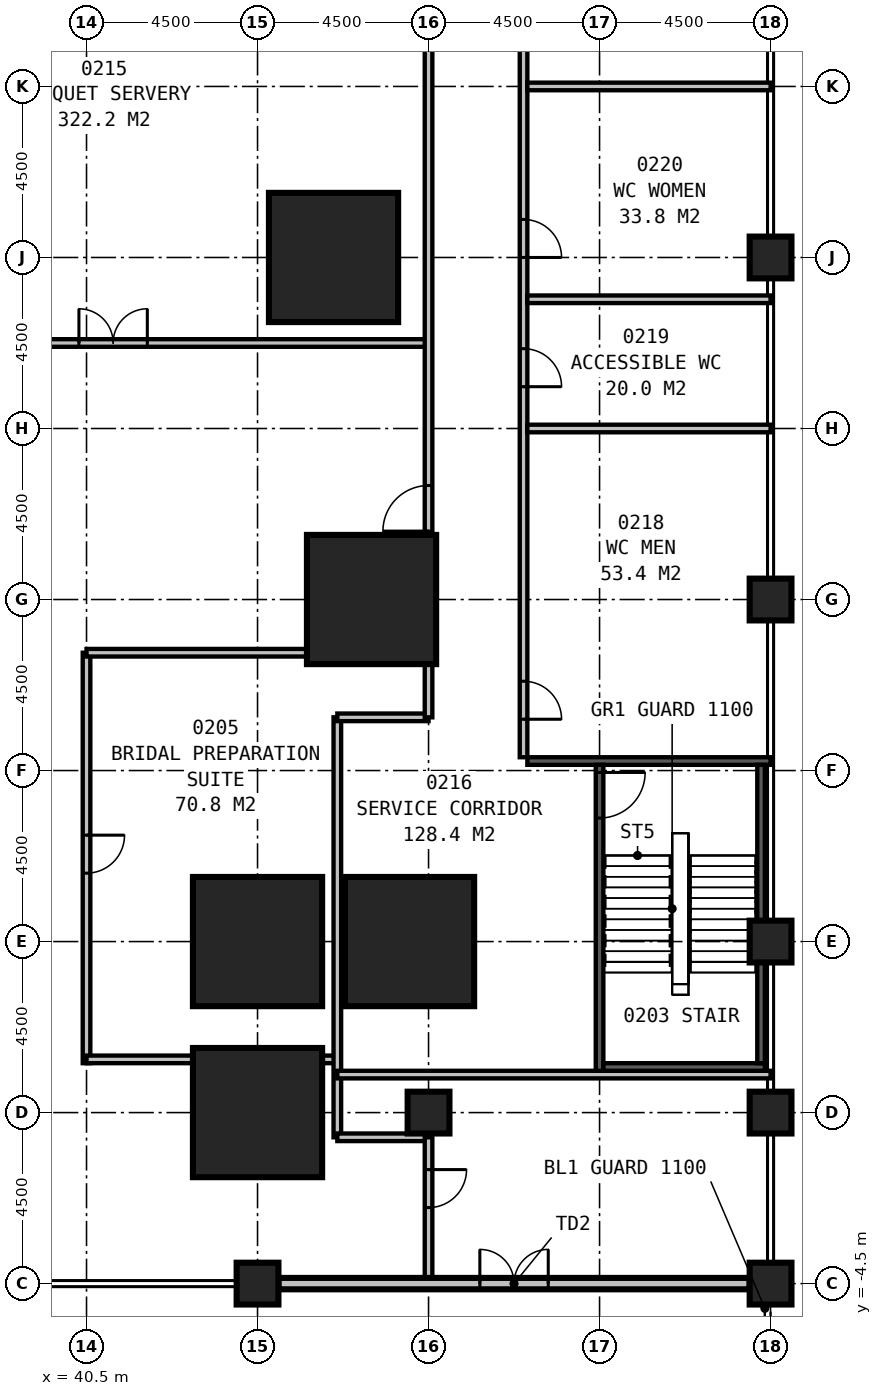
"""IFC4 building model, lengths in metres.
Left out: names, types, materials, properties, quantities, classifications, styles, units other than length and angle.
Written with IfcOpenShell. Run it as: python <this file> out.ifc"""

import sys

from ifc_helpers import new_model, si_unit, direction, frame, frame_2d, origin, origin_2d, place, context, subcontext, project, spatial, rectangle, extrude, element, fill, save


model = new_model("IFC4")
c1 = context("Model", 3, precision=1e-05, world=origin(), true_north=direction((0.0, 1.0)))
c2 = subcontext(c1, "Body", "Model", "MODEL_VIEW")
j1 = project(units=[si_unit("LENGTHUNIT", "METRE"), si_unit("PLANEANGLEUNIT", "RADIAN")], contexts=[c1])
p1 = place(None, origin())
s1 = spatial("IfcSite", under=j1, at=p1, CompositionType="ELEMENT")
p2 = place(p1, origin())
s2 = spatial("IfcBuilding", under=s1, at=p2, CompositionType="ELEMENT")
p3 = place(p2, frame((0.0, 0.0, 11.0)))
s3 = spatial("IfcBuildingStorey", under=s2, at=p3, CompositionType="ELEMENT", Elevation=11.0)
for number, where, z_axis, x_axis in (
    (1, (45.0, 0.0, 0.0), (0.0, 0.0, 1.0), (1.0, 0.0, 0.0)),
    (2, (45.0, 4.5, 0.0), (0.0, 0.0, 1.0), (1.0, 0.0, 0.0)),
    (3, (49.0, 4.5, 0.0), (0.0, 0.0, 1.0), (1.0, 0.0, 0.0)),
    (4, (48.0, 13.5, 0.0), (0.0, 0.0, 1.0), (1.0, 0.0, 0.0)),
    (5, (47.0, 22.5, 0.0), (0.0, 0.0, 1.0), (1.0, 0.0, 0.0)),
):
    element("IfcColumn", number, at=place(p3, frame(where, z_axis=z_axis, x_axis=x_axis)), inside=s3, PredefinedType="COLUMN", context=c2, shape_type="SweptSolid", body=[
        extrude(rectangle(XDim=3.4, YDim=3.4, at=origin_2d()), origin(), (0.0, 0.0, 1.0), 8.0),
    ])
for number, where, z_axis, x_axis in (
    (6, (58.5, -4.5, 0.0), (0.0, 0.0, 1.0), (1.0, 0.0, 0.0)),
    (7, (58.5, 4.5, 0.0), (0.0, 0.0, 1.0), (1.0, 0.0, 0.0)),
    (8, (58.5, 13.5, 0.0), (0.0, 0.0, 1.0), (1.0, 0.0, 0.0)),
    (9, (58.5, 22.5, 0.0), (0.0, 0.0, 1.0), (1.0, 0.0, 0.0)),
    (10, (58.5, 0.0, 0.0), (0.0, 0.0, 1.0), (1.0, 0.0, 0.0)),
    (11, (45.0, -4.5, 0.0), (0.0, 0.0, 1.0), (1.0, 0.0, 0.0)),
    (12, (49.5, 0.0, 0.0), (0.0, 0.0, 1.0), (1.0, 0.0, 0.0)),
):
    element("IfcColumn", number, at=place(p3, frame(where, z_axis=z_axis, x_axis=x_axis)), inside=s3, PredefinedType="COLUMN", context=c2, shape_type="SweptSolid", body=[
        extrude(rectangle(XDim=1.1, YDim=1.1, at=origin_2d()), origin(), (0.0, 0.0, 1.0), 8.0),
    ])
p4 = place(p3, frame((45.55, -4.5, 0.0), z_axis=(0.0, 0.0, 1.0), x_axis=(1.0, 0.0, 0.0)))
e13 = element("IfcWall", 13, at=p4, inside=s3, PredefinedType="STANDARD", context=c2, shape_type="SweptSolid", body=[
    extrude(rectangle(XDim=12.4, YDim=0.3, at=frame_2d((6.2, 0.0))), origin(), (0.0, 0.0, 1.0), 6.0),
])
p5 = place(p4, frame((5.3, 0.0, 0.0)))
e14 = element("IfcOpeningElement", 14, at=p5, cuts=e13, PredefinedType="OPENING", context=c2, shape_type="SweptSolid", body=[
    extrude(rectangle(XDim=1.8, YDim=2.4, at=frame_2d((0.9, 1.2))), frame((0.0, 0.16, 0.0), z_axis=(0.0, -1.0, 0.0), x_axis=(1.0, 0.0, 0.0)), (0.0, 0.0, 1.0), 0.32),
])
p6 = place(p3, frame((54.0, 1.1, 0.0), z_axis=(0.0, 0.0, 1.0), x_axis=(0.0, 1.0, 0.0)))
e15 = element("IfcWall", 15, at=p6, inside=s3, PredefinedType="SOLIDWALL", context=c2, shape_type="SweptSolid", body=[
    extrude(rectangle(XDim=8.05, YDim=0.2, at=frame_2d((4.025, 0.0))), origin(), (0.0, 0.0, 1.0), 7.7),
])
p7 = place(p6, frame((7.85, 0.0, 0.0), z_axis=(0.0, 0.0, 1.0), x_axis=(-1.0, 0.0, 0.0)))
e16 = element("IfcOpeningElement", 16, at=p7, cuts=e15, PredefinedType="OPENING", context=c2, shape_type="SweptSolid", body=[
    extrude(rectangle(XDim=1.2, YDim=2.1, at=frame_2d((0.6, 1.05))), frame((0.0, 0.11, 0.0), z_axis=(0.0, -1.0, 0.0), x_axis=(1.0, 0.0, 0.0)), (0.0, 0.0, 1.0), 0.22),
])
p8 = place(p3, frame((52.1, 9.25, 0.0), z_axis=(0.0, 0.0, 1.0), x_axis=(1.0, 0.0, 0.0)))
e17 = element("IfcWall", 17, at=p8, inside=s3, PredefinedType="SOLIDWALL", context=c2, shape_type="SweptSolid", body=[
    extrude(rectangle(XDim=6.4, YDim=0.2, at=frame_2d((3.2, 0.0))), origin(), (0.0, 0.0, 1.0), 7.7),
])
p9 = place(p3, frame((54.1, 1.2, 0.0), z_axis=(0.0, 0.0, 1.0), x_axis=(1.0, 0.0, 0.0)))
e18 = element("IfcWall", 18, at=p9, inside=s3, PredefinedType="SOLIDWALL", context=c2, shape_type="SweptSolid", body=[
    extrude(rectangle(XDim=4.25, YDim=0.2, at=frame_2d((2.125, 0.0))), origin(), (0.0, 0.0, 1.0), 7.7),
])
p10 = place(p3, frame((58.25, 1.3, 0.0), z_axis=(0.0, 0.0, 1.0), x_axis=(0.0, 1.0, 0.0)))
e19 = element("IfcWall", 19, at=p10, inside=s3, PredefinedType="SOLIDWALL", context=c2, shape_type="SweptSolid", body=[
    extrude(rectangle(XDim=2.65, YDim=0.2, at=frame_2d((1.325, 0.0))), origin(), (0.0, 0.0, 1.0), 7.7),
])
p11 = place(p3, frame((58.25, 5.05, 0.0), z_axis=(0.0, 0.0, 1.0), x_axis=(0.0, 1.0, 0.0)))
e20 = element("IfcWall", 20, at=p11, inside=s3, PredefinedType="SOLIDWALL", context=c2, shape_type="SweptSolid", body=[
    extrude(rectangle(XDim=4.1, YDim=0.2, at=frame_2d((2.05, 0.0))), origin(), (0.0, 0.0, 1.0), 7.7),
])
p12 = place(p3, frame((49.5, -4.5, 0.0), z_axis=(0.0, 0.0, 1.0), x_axis=(0.0, 1.0, 0.0)))
e21 = element("IfcWall", 21, at=p12, inside=s3, PredefinedType="PARTITIONING", context=c2, shape_type="SweptSolid", body=[
    extrude(rectangle(XDim=3.85, YDim=0.2, at=frame_2d((1.925, 0.0))), origin(), (0.0, 0.0, 1.0), 7.7),
])
p13 = place(p12, frame((3.0, 0.0, 0.0), z_axis=(0.0, 0.0, 1.0), x_axis=(-1.0, 0.0, 0.0)))
e22 = element("IfcOpeningElement", 22, at=p13, cuts=e21, PredefinedType="OPENING", context=c2, shape_type="SweptSolid", body=[
    extrude(rectangle(XDim=1.0, YDim=2.1, at=frame_2d((0.5, 1.05))), frame((0.0, 0.11, 0.0), z_axis=(0.0, -1.0, 0.0), x_axis=(1.0, 0.0, 0.0)), (0.0, 0.0, 1.0), 0.22),
])
p14 = place(p3, frame((47.1, -0.65, 0.0), z_axis=(0.0, 0.0, 1.0), x_axis=(1.0, 0.0, 0.0)))
e23 = element("IfcWall", 23, at=p14, inside=s3, PredefinedType="PARTITIONING", context=c2, shape_type="SweptSolid", body=[
    extrude(rectangle(XDim=2.4, YDim=0.2, at=frame_2d((1.2, 0.0))), origin(), (0.0, 0.0, 1.0), 6.8),
])
p15 = place(p3, frame((47.1, -0.65, 0.0), z_axis=(0.0, 0.0, 1.0), x_axis=(0.0, 1.0, 0.0)))
e24 = element("IfcWall", 24, at=p15, inside=s3, PredefinedType="PARTITIONING", context=c2, shape_type="SweptSolid", body=[
    extrude(rectangle(XDim=11.05, YDim=0.2, at=frame_2d((5.525, 0.0))), origin(), (0.0, 0.0, 1.0), 7.7),
])
p16 = place(p3, frame((47.1, 10.4, 0.0), z_axis=(0.0, 0.0, 1.0), x_axis=(1.0, 0.0, 0.0)))
e25 = element("IfcWall", 25, at=p16, inside=s3, PredefinedType="PARTITIONING", context=c2, shape_type="SweptSolid", body=[
    extrude(rectangle(XDim=2.4, YDim=0.2, at=frame_2d((1.2, 0.0))), origin(), (0.0, 0.0, 1.0), 7.7),
])
p17 = place(p3, frame((49.5, 10.4, 0.0), z_axis=(0.0, 0.0, 1.0), x_axis=(0.0, 1.0, 0.0)))
e26 = element("IfcWall", 26, at=p17, inside=s3, PredefinedType="PARTITIONING", context=c2, shape_type="SweptSolid", body=[
    extrude(rectangle(XDim=30.1, YDim=0.2, at=frame_2d((15.05, 0.0))), origin(), (0.0, 0.0, 1.0), 7.7),
])
p18 = place(p17, frame((4.9, 0.0, 0.0)))
e27 = element("IfcOpeningElement", 27, at=p18, cuts=e26, PredefinedType="OPENING", context=c2, shape_type="SweptSolid", body=[
    extrude(rectangle(XDim=1.2, YDim=2.1, at=frame_2d((0.6, 1.05))), frame((0.0, 0.11, 0.0), z_axis=(0.0, -1.0, 0.0), x_axis=(1.0, 0.0, 0.0)), (0.0, 0.0, 1.0), 0.22),
])
p19 = place(p3, frame((40.5, 1.3, 0.0), z_axis=(0.0, 0.0, 1.0), x_axis=(0.0, 1.0, 0.0)))
e28 = element("IfcWall", 28, at=p19, inside=s3, PredefinedType="PARTITIONING", context=c2, shape_type="SweptSolid", body=[
    extrude(rectangle(XDim=10.8, YDim=0.2, at=frame_2d((5.4, 0.0))), origin(), (0.0, 0.0, 1.0), 6.7),
])
p20 = place(p19, frame((6.0, 0.0, 0.0), z_axis=(0.0, 0.0, 1.0), x_axis=(-1.0, 0.0, 0.0)))
e29 = element("IfcOpeningElement", 29, at=p20, cuts=e28, PredefinedType="OPENING", context=c2, shape_type="SweptSolid", body=[
    extrude(rectangle(XDim=1.0, YDim=2.1, at=frame_2d((0.5, 1.05))), frame((0.0, 0.11, 0.0), z_axis=(0.0, -1.0, 0.0), x_axis=(1.0, 0.0, 0.0)), (0.0, 0.0, 1.0), 0.22),
])
p21 = place(p3, frame((40.5, 12.1, 0.0), z_axis=(0.0, 0.0, 1.0), x_axis=(1.0, 0.0, 0.0)))
e30 = element("IfcWall", 30, at=p21, inside=s3, PredefinedType="PARTITIONING", context=c2, shape_type="SweptSolid", body=[
    extrude(rectangle(XDim=9.0, YDim=0.2, at=frame_2d((4.5, 0.0))), origin(), (0.0, 0.0, 1.0), 7.7),
])
p22 = place(p3, frame((40.5, 1.4, 0.0), z_axis=(0.0, 0.0, 1.0), x_axis=(1.0, 0.0, 0.0)))
e31 = element("IfcWall", 31, at=p22, inside=s3, PredefinedType="PARTITIONING", context=c2, shape_type="SweptSolid", body=[
    extrude(rectangle(XDim=6.6, YDim=0.2, at=frame_2d((3.3, 0.0))), origin(), (0.0, 0.0, 1.0), 6.8),
])
p23 = place(p3, frame((36.3, 20.25, 0.0), z_axis=(0.0, 0.0, 1.0), x_axis=(1.0, 0.0, 0.0)))
e32 = element("IfcWall", 32, at=p23, inside=s3, PredefinedType="PARTITIONING", context=c2, shape_type="SweptSolid", body=[
    extrude(rectangle(XDim=13.2, YDim=0.2, at=frame_2d((6.6, 0.0))), origin(), (0.0, 0.0, 1.0), 7.7),
])
p24 = place(p23, frame((4.0, 0.0, 0.0)))
e33 = element("IfcOpeningElement", 33, at=p24, cuts=e32, PredefinedType="OPENING", context=c2, shape_type="SweptSolid", body=[
    extrude(rectangle(XDim=1.8, YDim=2.4, at=frame_2d((0.9, 1.2))), frame((0.0, 0.11, 0.0), z_axis=(0.0, -1.0, 0.0), x_axis=(1.0, 0.0, 0.0)), (0.0, 0.0, 1.0), 0.22),
])
p25 = place(p3, frame((52.0, 9.35, 0.0), z_axis=(0.0, 0.0, 1.0), x_axis=(0.0, 1.0, 0.0)))
e34 = element("IfcWall", 34, at=p25, inside=s3, PredefinedType="PARTITIONING", context=c2, shape_type="SweptSolid", body=[
    extrude(rectangle(XDim=31.15, YDim=0.2, at=frame_2d((15.575, 0.0))), origin(), (0.0, 0.0, 1.0), 7.7),
])
p26 = place(p25, frame((2.0, 0.0, 0.0), z_axis=(0.0, 0.0, 1.0), x_axis=(-1.0, 0.0, 0.0)))
e35 = element("IfcOpeningElement", 35, at=p26, cuts=e34, PredefinedType="OPENING", context=c2, shape_type="SweptSolid", body=[
    extrude(rectangle(XDim=1.0, YDim=2.1, at=frame_2d((0.5, 1.05))), frame((0.0, 0.11, 0.0), z_axis=(0.0, -1.0, 0.0), x_axis=(1.0, 0.0, 0.0)), (0.0, 0.0, 1.0), 0.22),
])
p27 = place(p25, frame((10.75, 0.0, 0.0), z_axis=(0.0, 0.0, 1.0), x_axis=(-1.0, 0.0, 0.0)))
e36 = element("IfcOpeningElement", 36, at=p27, cuts=e34, PredefinedType="OPENING", context=c2, shape_type="SweptSolid", body=[
    extrude(rectangle(XDim=1.0, YDim=2.1, at=frame_2d((0.5, 1.05))), frame((0.0, 0.11, 0.0), z_axis=(0.0, -1.0, 0.0), x_axis=(1.0, 0.0, 0.0)), (0.0, 0.0, 1.0), 0.22),
])
p28 = place(p25, frame((14.15, 0.0, 0.0), z_axis=(0.0, 0.0, 1.0), x_axis=(-1.0, 0.0, 0.0)))
e37 = element("IfcOpeningElement", 37, at=p28, cuts=e34, PredefinedType="OPENING", context=c2, shape_type="SweptSolid", body=[
    extrude(rectangle(XDim=1.0, YDim=2.1, at=frame_2d((0.5, 1.05))), frame((0.0, 0.11, 0.0), z_axis=(0.0, -1.0, 0.0), x_axis=(1.0, 0.0, 0.0)), (0.0, 0.0, 1.0), 0.22),
])
p29 = place(p25, frame((19.75, 0.0, 0.0), z_axis=(0.0, 0.0, 1.0), x_axis=(-1.0, 0.0, 0.0)))
e38 = element("IfcOpeningElement", 38, at=p29, cuts=e34, PredefinedType="OPENING", context=c2, shape_type="SweptSolid", body=[
    extrude(rectangle(XDim=1.0, YDim=2.1, at=frame_2d((0.5, 1.05))), frame((0.0, 0.11, 0.0), z_axis=(0.0, -1.0, 0.0), x_axis=(1.0, 0.0, 0.0)), (0.0, 0.0, 1.0), 0.22),
])
p30 = place(p3, frame((47.1, 1.0, 0.0), z_axis=(0.0, 0.0, 1.0), x_axis=(1.0, 0.0, 0.0)))
e39 = element("IfcWall", 39, at=p30, inside=s3, PredefinedType="PARTITIONING", context=c2, shape_type="SweptSolid", body=[
    extrude(rectangle(XDim=11.4, YDim=0.2, at=frame_2d((5.7, 0.0))), origin(), (0.0, 0.0, 1.0), 6.8),
])
for number, where, z_axis, x_axis in (
    (40, (52.1, 18.0, 0.0), (0.0, 0.0, 1.0), (1.0, 0.0, 0.0)),
    (41, (52.1, 21.4, 0.0), (0.0, 0.0, 1.0), (1.0, 0.0, 0.0)),
    (42, (52.1, 27.0, 0.0), (0.0, 0.0, 1.0), (1.0, 0.0, 0.0)),
):
    element("IfcWall", number, at=place(p3, frame(where, z_axis=z_axis, x_axis=x_axis)), inside=s3, PredefinedType="PARTITIONING", context=c2, shape_type="SweptSolid", body=[
        extrude(rectangle(XDim=6.4, YDim=0.2, at=frame_2d((3.2, 0.0))), origin(), (0.0, 0.0, 1.0), 7.7),
    ])
p31 = place(p5, origin())
e43 = element("IfcDoor", 43, at=p31, inside=s3, OperationType="DOUBLE_DOOR_SINGLE_SWING", PredefinedType="DOOR", context=c2, shape_type="SweptSolid", body=[
    extrude(rectangle(XDim=1.8, YDim=2.4, at=frame_2d((0.9, 1.2))), frame((0.0, 0.025, 0.0), z_axis=(0.0, -1.0, 0.0), x_axis=(1.0, 0.0, 0.0)), (0.0, 0.0, 1.0), 0.05),
])
fill(e14, e43)
p32 = place(p7, origin())
e44 = element("IfcDoor", 44, at=p32, inside=s3, OperationType="SINGLE_SWING_LEFT", PredefinedType="DOOR", context=c2, shape_type="SweptSolid", body=[
    extrude(rectangle(XDim=1.2, YDim=2.1, at=frame_2d((0.6, 1.05))), frame((0.0, 0.025, 0.0), z_axis=(0.0, -1.0, 0.0), x_axis=(1.0, 0.0, 0.0)), (0.0, 0.0, 1.0), 0.05),
])
fill(e16, e44)
p33 = place(p13, origin())
e45 = element("IfcDoor", 45, at=p33, inside=s3, OperationType="SINGLE_SWING_LEFT", PredefinedType="DOOR", context=c2, shape_type="SweptSolid", body=[
    extrude(rectangle(XDim=1.0, YDim=2.1, at=frame_2d((0.5, 1.05))), frame((0.0, 0.025, 0.0), z_axis=(0.0, -1.0, 0.0), x_axis=(1.0, 0.0, 0.0)), (0.0, 0.0, 1.0), 0.05),
])
fill(e22, e45)
p34 = place(p18, origin())
e46 = element("IfcDoor", 46, at=p34, inside=s3, OperationType="SINGLE_SWING_LEFT", PredefinedType="DOOR", context=c2, shape_type="SweptSolid", body=[
    extrude(rectangle(XDim=1.2, YDim=2.1, at=frame_2d((0.6, 1.05))), frame((0.0, 0.025, 0.0), z_axis=(0.0, -1.0, 0.0), x_axis=(1.0, 0.0, 0.0)), (0.0, 0.0, 1.0), 0.05),
])
fill(e27, e46)
p35 = place(p20, origin())
e47 = element("IfcDoor", 47, at=p35, inside=s3, OperationType="SINGLE_SWING_LEFT", PredefinedType="DOOR", context=c2, shape_type="SweptSolid", body=[
    extrude(rectangle(XDim=1.0, YDim=2.1, at=frame_2d((0.5, 1.05))), frame((0.0, 0.025, 0.0), z_axis=(0.0, -1.0, 0.0), x_axis=(1.0, 0.0, 0.0)), (0.0, 0.0, 1.0), 0.05),
])
fill(e29, e47)
p36 = place(p24, origin())
e48 = element("IfcDoor", 48, at=p36, inside=s3, OperationType="DOUBLE_DOOR_SINGLE_SWING", PredefinedType="DOOR", context=c2, shape_type="SweptSolid", body=[
    extrude(rectangle(XDim=1.8, YDim=2.4, at=frame_2d((0.9, 1.2))), frame((0.0, 0.025, 0.0), z_axis=(0.0, -1.0, 0.0), x_axis=(1.0, 0.0, 0.0)), (0.0, 0.0, 1.0), 0.05),
])
fill(e33, e48)
p37 = place(p26, origin())
e49 = element("IfcDoor", 49, at=p37, inside=s3, OperationType="SINGLE_SWING_RIGHT", PredefinedType="DOOR", context=c2, shape_type="SweptSolid", body=[
    extrude(rectangle(XDim=1.0, YDim=2.1, at=frame_2d((0.5, 1.05))), frame((0.0, 0.025, 0.0), z_axis=(0.0, -1.0, 0.0), x_axis=(1.0, 0.0, 0.0)), (0.0, 0.0, 1.0), 0.05),
])
fill(e35, e49)
p38 = place(p27, origin())
e50 = element("IfcDoor", 50, at=p38, inside=s3, OperationType="SINGLE_SWING_RIGHT", PredefinedType="DOOR", context=c2, shape_type="SweptSolid", body=[
    extrude(rectangle(XDim=1.0, YDim=2.1, at=frame_2d((0.5, 1.05))), frame((0.0, 0.025, 0.0), z_axis=(0.0, -1.0, 0.0), x_axis=(1.0, 0.0, 0.0)), (0.0, 0.0, 1.0), 0.05),
])
fill(e36, e50)
p39 = place(p28, origin())
e51 = element("IfcDoor", 51, at=p39, inside=s3, OperationType="SINGLE_SWING_RIGHT", PredefinedType="DOOR", context=c2, shape_type="SweptSolid", body=[
    extrude(rectangle(XDim=1.0, YDim=2.1, at=frame_2d((0.5, 1.05))), frame((0.0, 0.025, 0.0), z_axis=(0.0, -1.0, 0.0), x_axis=(1.0, 0.0, 0.0)), (0.0, 0.0, 1.0), 0.05),
])
fill(e37, e51)
save(model, sys.argv[1])
